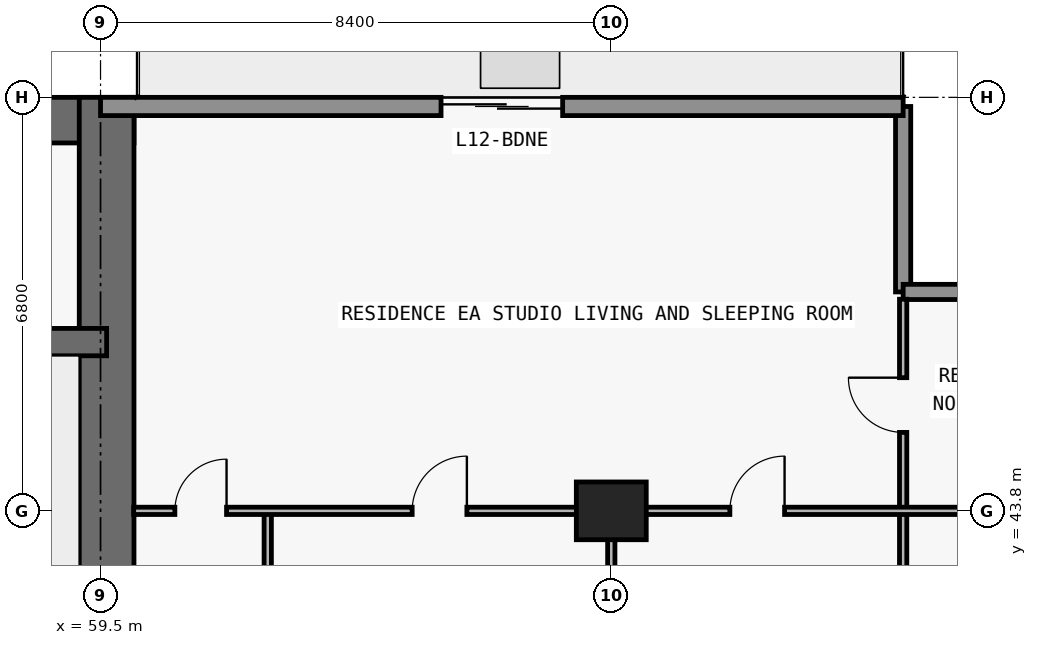
"""IFC4 building model, lengths in metres.
Left out: names, types, materials, properties, quantities, classifications, styles, units other than length and angle.
Written with IfcOpenShell. Run it as: python <this file> out.ifc"""

import sys

from ifc_helpers import new_model, si_unit, direction, frame, frame_2d, origin, origin_2d, place, context, subcontext, project, spatial, rectangle, extrude, element, fill, save


model = new_model("IFC4")
c1 = context("Model", 3, precision=1e-05, world=origin(), true_north=direction((0.0, 1.0)))
c2 = subcontext(c1, "Body", "Model", "MODEL_VIEW")
j1 = project(units=[si_unit("LENGTHUNIT", "METRE"), si_unit("PLANEANGLEUNIT", "RADIAN")], contexts=[c1])
p1 = place(None, origin())
s1 = spatial("IfcSite", under=j1, at=p1, CompositionType="ELEMENT")
p2 = place(p1, origin())
s2 = spatial("IfcBuilding", under=s1, at=p2, CompositionType="ELEMENT")
p3 = place(p2, frame((0.0, 0.0, 49.8)))
s3 = spatial("IfcBuildingStorey", under=s2, at=p3, CompositionType="ELEMENT", Elevation=49.8)
p4 = place(p3, frame((67.9, 43.8, 0.0), z_axis=(0.0, 0.0, 1.0), x_axis=(1.0, 0.0, 0.0)))
e1 = element("IfcColumn", 1, at=p4, inside=s3, PredefinedType="COLUMN", context=c2, shape_type="SweptSolid", body=[
    extrude(rectangle(XDim=1.15, YDim=0.95, at=origin_2d()), origin(), (0.0, 0.0, 1.0), 3.05),
])
p5 = place(p3, frame((17.75, 50.225, 0.0), z_axis=(0.0, 0.0, 1.0), x_axis=(1.0, 0.0, 0.0)))
e2 = element("IfcWall", 2, at=p5, inside=s3, PredefinedType="SHEAR", context=c2, shape_type="SweptSolid", body=[
    extrude(rectangle(XDim=42.3, YDim=0.75, at=frame_2d((21.15, 0.0))), origin(), (0.0, 0.0, 1.0), 3.05),
])
p6 = place(p3, frame((59.6, 36.45, 0.0), z_axis=(0.0, 0.0, 1.0), x_axis=(0.0, 1.0, 0.0)))
e3 = element("IfcWall", 3, at=p6, inside=s3, PredefinedType="SHEAR", context=c2, shape_type="SweptSolid", body=[
    extrude(rectangle(XDim=14.15, YDim=0.9, at=frame_2d((7.075, 0.0))), origin(), (0.0, 0.0, 1.0), 3.05),
])
p7 = place(p3, frame((18.2, 46.575, 0.0), z_axis=(0.0, 0.0, 1.0), x_axis=(1.0, 0.0, 0.0)))
e4 = element("IfcWall", 4, at=p7, inside=s3, PredefinedType="SHEAR", context=c2, shape_type="SweptSolid", body=[
    extrude(rectangle(XDim=41.4, YDim=0.45, at=frame_2d((20.7, 0.0))), origin(), (0.0, 0.0, 1.0), 3.05),
])
p8 = place(p7, frame((7.675, 0.0, 0.0)))
e5 = element("IfcOpeningElement", 5, at=p8, cuts=e4, PredefinedType="OPENING", context=c2, shape_type="SweptSolid", body=[
    extrude(rectangle(XDim=1.05, YDim=2.15, at=frame_2d((0.525, 1.075))), frame((0.0, 0.235, 0.0), z_axis=(0.0, -1.0, 0.0), x_axis=(1.0, 0.0, 0.0)), (0.0, 0.0, 1.0), 0.47),
])
p9 = place(p7, frame((32.725, 0.0, 0.0)))
e6 = element("IfcOpeningElement", 6, at=p9, cuts=e4, PredefinedType="OPENING", context=c2, shape_type="SweptSolid", body=[
    extrude(rectangle(XDim=1.05, YDim=2.15, at=frame_2d((0.525, 1.075))), frame((0.0, 0.235, 0.0), z_axis=(0.0, -1.0, 0.0), x_axis=(1.0, 0.0, 0.0)), (0.0, 0.0, 1.0), 0.47),
])
p10 = place(p3, frame((72.7, 50.45, 0.0), z_axis=(0.0, 0.0, 1.0), x_axis=(0.0, -1.0, 0.0)))
e7 = element("IfcWall", 7, at=p10, inside=s3, PredefinedType="ELEMENTEDWALL", context=c2, shape_type="SweptSolid", body=[
    extrude(rectangle(XDim=3.05, YDim=0.25, at=frame_2d((1.525, 0.0))), origin(), (0.0, 0.0, 1.0), 3.05),
])
p11 = place(p3, frame((72.7, 47.4, 0.0), z_axis=(0.0, 0.0, 1.0), x_axis=(1.0, 0.0, 0.0)))
e8 = element("IfcWall", 8, at=p11, inside=s3, PredefinedType="ELEMENTEDWALL", context=c2, shape_type="SweptSolid", body=[
    extrude(rectangle(XDim=3.45, YDim=0.25, at=frame_2d((1.725, 0.0))), origin(), (0.0, 0.0, 1.0), 3.05),
])
p12 = place(p3, frame((59.5, 50.45, 0.0), z_axis=(0.0, 0.0, 1.0), x_axis=(1.0, 0.0, 0.0)))
e9 = element("IfcWall", 9, at=p12, inside=s3, PredefinedType="STANDARD", context=c2, shape_type="SweptSolid", body=[
    extrude(rectangle(XDim=13.2, YDim=0.3, at=frame_2d((6.6, 0.0))), origin(), (0.0, 0.0, 1.0), 3.05),
])
p13 = place(p12, frame((5.6, 0.0, 0.0)))
e10 = element("IfcOpeningElement", 10, at=p13, cuts=e9, PredefinedType="OPENING", context=c2, shape_type="SweptSolid", body=[
    extrude(rectangle(XDim=2.0, YDim=2.3, at=frame_2d((1.0, 1.15))), frame((0.0, 0.16, 0.0), z_axis=(0.0, -1.0, 0.0), x_axis=(1.0, 0.0, 0.0)), (0.0, 0.0, 1.0), 0.32),
])
p14 = place(p3, frame((62.25, 36.9, 0.0), z_axis=(0.0, 0.0, 1.0), x_axis=(0.0, 1.0, 0.0)))
e11 = element("IfcWall", 11, at=p14, inside=s3, PredefinedType="PARTITIONING", context=c2, shape_type="SweptSolid", body=[
    extrude(rectangle(XDim=6.9, YDim=0.12, at=frame_2d((3.45, 0.0))), origin(), (0.0, 0.0, 1.0), 2.486),
])
p15 = place(p14, frame((1.231, 0.0, 0.0)))
e12 = element("IfcOpeningElement", 12, at=p15, cuts=e11, PredefinedType="OPENING", context=c2, shape_type="SweptSolid", body=[
    extrude(rectangle(XDim=0.85, YDim=2.1, at=frame_2d((0.425, 1.05))), frame((0.0, 0.07, 0.0), z_axis=(0.0, -1.0, 0.0), x_axis=(1.0, 0.0, 0.0)), (0.0, 0.0, 1.0), 0.14),
])
p16 = place(p3, frame((67.9, 36.9, 0.0), z_axis=(0.0, 0.0, 1.0), x_axis=(0.0, 1.0, 0.0)))
e13 = element("IfcWall", 13, at=p16, inside=s3, PredefinedType="PARTITIONING", context=c2, shape_type="SweptSolid", body=[
    extrude(rectangle(XDim=6.9, YDim=0.12, at=frame_2d((3.45, 0.0))), origin(), (0.0, 0.0, 1.0), 2.11),
])
p17 = place(p3, frame((72.7, 36.905, 0.0), z_axis=(0.0, 0.0, 1.0), x_axis=(0.0, 1.0, 0.0)))
e14 = element("IfcWall", 14, at=p17, inside=s3, PredefinedType="PARTITIONING", context=c2, shape_type="SweptSolid", body=[
    extrude(rectangle(XDim=10.375, YDim=0.12, at=frame_2d((5.188, 0.0))), origin(), (0.0, 0.0, 1.0), 3.05),
])
p18 = place(p17, frame((2.998, 0.0, 0.0)))
e15 = element("IfcOpeningElement", 15, at=p18, cuts=e14, PredefinedType="OPENING", context=c2, shape_type="SweptSolid", body=[
    extrude(rectangle(XDim=0.9, YDim=2.15, at=frame_2d((0.45, 1.075))), frame((0.0, 0.07, 0.0), z_axis=(0.0, -1.0, 0.0), x_axis=(1.0, 0.0, 0.0)), (0.0, 0.0, 1.0), 0.14),
])
p19 = place(p17, frame((8.185, 0.0, 0.0)))
e16 = element("IfcOpeningElement", 16, at=p19, cuts=e14, PredefinedType="OPENING", context=c2, shape_type="SweptSolid", body=[
    extrude(rectangle(XDim=0.9, YDim=2.15, at=frame_2d((0.45, 1.075))), frame((0.0, 0.07, 0.0), z_axis=(0.0, -1.0, 0.0), x_axis=(1.0, 0.0, 0.0)), (0.0, 0.0, 1.0), 0.14),
])
p20 = place(p3, frame((60.045, 43.8, 0.0), z_axis=(0.0, 0.0, 1.0), x_axis=(1.0, 0.0, 0.0)))
e17 = element("IfcWall", 17, at=p20, inside=s3, PredefinedType="PARTITIONING", context=c2, shape_type="SweptSolid", body=[
    extrude(rectangle(XDim=15.96, YDim=0.12, at=frame_2d((7.98, 0.0))), origin(), (0.0, 0.0, 1.0), 2.339),
])
p21 = place(p20, frame((9.805, 0.0, 0.0)))
e18 = element("IfcOpeningElement", 18, at=p21, cuts=e17, PredefinedType="OPENING", context=c2, shape_type="SweptSolid", body=[
    extrude(rectangle(XDim=0.9, YDim=2.15, at=frame_2d((0.45, 1.075))), frame((0.0, 0.07, 0.0), z_axis=(0.0, -1.0, 0.0), x_axis=(1.0, 0.0, 0.0)), (0.0, 0.0, 1.0), 0.14),
])
p22 = place(p20, frame((4.58, 0.0, 0.0)))
e19 = element("IfcOpeningElement", 19, at=p22, cuts=e17, PredefinedType="OPENING", context=c2, shape_type="SweptSolid", body=[
    extrude(rectangle(XDim=0.9, YDim=2.15, at=frame_2d((0.45, 1.075))), frame((0.0, 0.07, 0.0), z_axis=(0.0, -1.0, 0.0), x_axis=(1.0, 0.0, 0.0)), (0.0, 0.0, 1.0), 0.14),
])
p23 = place(p20, frame((0.677, 0.0, 0.0)))
e20 = element("IfcOpeningElement", 20, at=p23, cuts=e17, PredefinedType="OPENING", context=c2, shape_type="SweptSolid", body=[
    extrude(rectangle(XDim=0.85, YDim=2.1, at=frame_2d((0.425, 1.05))), frame((0.0, 0.07, 0.0), z_axis=(0.0, -1.0, 0.0), x_axis=(1.0, 0.0, 0.0)), (0.0, 0.0, 1.0), 0.14),
])
p24 = place(p13, origin())
e21 = element("IfcDoor", 21, at=p24, inside=s3, OperationType="DOUBLE_DOOR_SLIDING", PredefinedType="DOOR", context=c2, shape_type="SweptSolid", body=[
    extrude(rectangle(XDim=2.0, YDim=2.3, at=frame_2d((1.0, 1.15))), frame((0.0, 0.025, 0.0), z_axis=(0.0, -1.0, 0.0), x_axis=(1.0, 0.0, 0.0)), (0.0, 0.0, 1.0), 0.05),
])
fill(e10, e21)
p25 = place(p21, origin())
e22 = element("IfcDoor", 22, at=p25, inside=s3, OperationType="SINGLE_SWING_RIGHT", PredefinedType="DOOR", context=c2, shape_type="SweptSolid", body=[
    extrude(rectangle(XDim=0.9, YDim=2.15, at=frame_2d((0.45, 1.075))), frame((0.0, 0.025, 0.0), z_axis=(0.0, -1.0, 0.0), x_axis=(1.0, 0.0, 0.0)), (0.0, 0.0, 1.0), 0.05),
])
fill(e18, e22)
p26 = place(p22, origin())
e23 = element("IfcDoor", 23, at=p26, inside=s3, OperationType="SINGLE_SWING_RIGHT", PredefinedType="DOOR", context=c2, shape_type="SweptSolid", body=[
    extrude(rectangle(XDim=0.9, YDim=2.15, at=frame_2d((0.45, 1.075))), frame((0.0, 0.025, 0.0), z_axis=(0.0, -1.0, 0.0), x_axis=(1.0, 0.0, 0.0)), (0.0, 0.0, 1.0), 0.05),
])
fill(e19, e23)
p27 = place(p23, origin())
e24 = element("IfcDoor", 24, at=p27, inside=s3, OperationType="SINGLE_SWING_RIGHT", PredefinedType="DOOR", context=c2, shape_type="SweptSolid", body=[
    extrude(rectangle(XDim=0.85, YDim=2.1, at=frame_2d((0.425, 1.05))), frame((0.0, 0.025, 0.0), z_axis=(0.0, -1.0, 0.0), x_axis=(1.0, 0.0, 0.0)), (0.0, 0.0, 1.0), 0.05),
])
fill(e20, e24)
p28 = place(p19, origin())
e25 = element("IfcDoor", 25, at=p28, inside=s3, OperationType="SINGLE_SWING_RIGHT", PredefinedType="DOOR", context=c2, shape_type="SweptSolid", body=[
    extrude(rectangle(XDim=0.9, YDim=2.15, at=frame_2d((0.45, 1.075))), frame((0.0, 0.025, 0.0), z_axis=(0.0, -1.0, 0.0), x_axis=(1.0, 0.0, 0.0)), (0.0, 0.0, 1.0), 0.05),
])
fill(e16, e25)
save(model, sys.argv[1])
